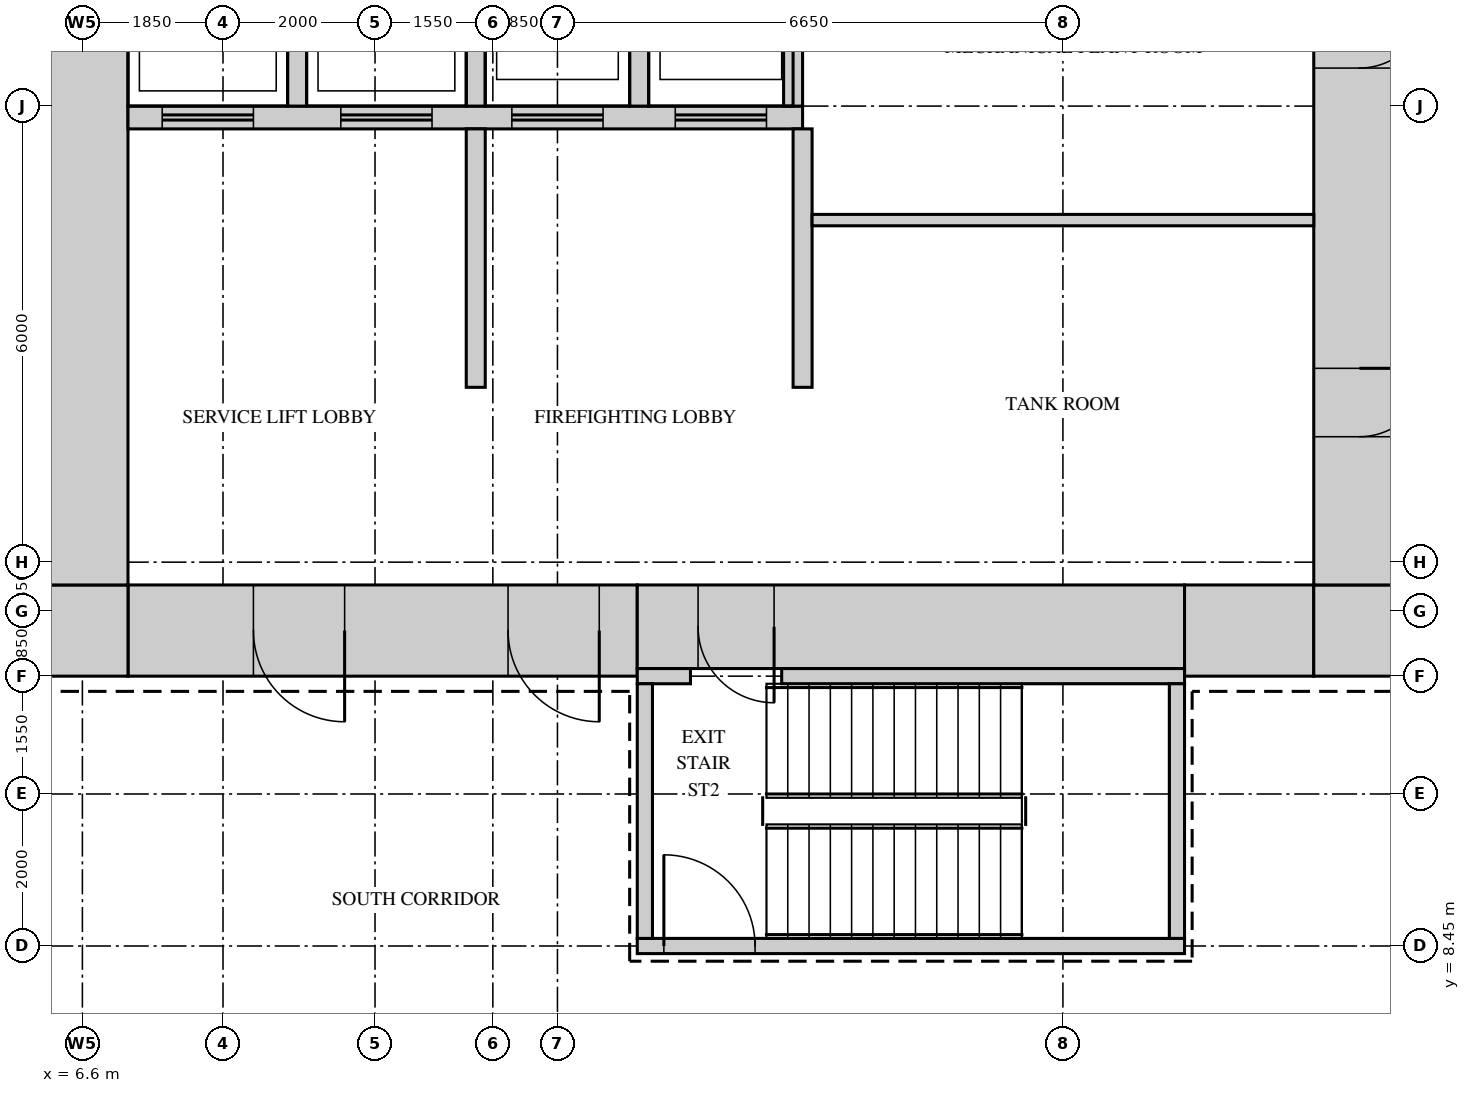
"""IFC4 building model, lengths in metres.
Left out: names, types, materials, properties, quantities, classifications, styles, units other than length and angle.
Written with IfcOpenShell. Run it as: python <this file> out.ifc"""

import sys

from ifc_helpers import new_model, si_unit, direction, frame, frame_2d, origin, place, context, subcontext, project, spatial, rectangle, extrude, source, transform, mapped, element, fill, save


model = new_model("IFC4")
c1 = context("Model", 3, precision=1e-05, world=origin(), true_north=direction((0.0, 1.0)))
c2 = subcontext(c1, "Body", "Model", "MODEL_VIEW")
j1 = project(units=[si_unit("LENGTHUNIT", "METRE"), si_unit("PLANEANGLEUNIT", "RADIAN")], contexts=[c1])
p1 = place(None, origin())
s1 = spatial("IfcSite", under=j1, at=p1, CompositionType="ELEMENT")
p2 = place(p1, origin())
s2 = spatial("IfcBuilding", under=s1, at=p2, CompositionType="ELEMENT")
p3 = place(p2, frame((0.0, 0.0, 42.0)))
s3 = spatial("IfcBuildingStorey", under=s2, at=p3, CompositionType="ELEMENT", Elevation=42.0)
m1 = source(origin(), c2, "Body", "SweptSolid", [
    extrude(rectangle(XDim=6.7, YDim=1.2, at=frame_2d((3.35, 0.0))), origin(), (0.0, 0.0, 1.0), 4.2),
])
p4 = place(p3, frame((7.2, 12.6, 0.0), z_axis=(0.0, 0.0, 1.0), x_axis=(1.0, 0.0, 0.0)))
e1 = element("IfcWall", 1, at=p4, inside=s3, PredefinedType="SHEAR", context=c2, shape_type="MappedRepresentation", body=[
    mapped(m1, transform((0.0, 0.0, 0.0))),
])
m2 = source(origin(), c2, "Body", "SweptSolid", [
    extrude(rectangle(XDim=1.2, YDim=2.1, at=frame_2d((0.6, 1.05))), frame((0.0, 0.61, 0.0), z_axis=(0.0, -1.0, 0.0), x_axis=(1.0, 0.0, 0.0)), (0.0, 0.0, 1.0), 1.22),
])
p5 = place(p4, frame((5.0, 0.0, 0.0)))
e2 = element("IfcOpeningElement", 2, at=p5, cuts=e1, PredefinedType="OPENING", context=c2, shape_type="MappedRepresentation", body=[
    mapped(m2, transform((0.0, 0.0, 0.0))),
])
p6 = place(p4, frame((1.65, 0.0, 0.0)))
e3 = element("IfcOpeningElement", 3, at=p6, cuts=e1, PredefinedType="OPENING", context=c2, shape_type="MappedRepresentation", body=[
    mapped(m2, transform((0.0, 0.0, 0.0))),
])
m3 = source(origin(), c2, "Body", "SweptSolid", [
    extrude(rectangle(XDim=7.2, YDim=1.1, at=frame_2d((3.6, 0.0))), origin(), (0.0, 0.0, 1.0), 4.2),
])
p7 = place(p3, frame((13.9, 12.65, 0.0), z_axis=(0.0, 0.0, 1.0), x_axis=(1.0, 0.0, 0.0)))
e4 = element("IfcWall", 4, at=p7, inside=s3, PredefinedType="SHEAR", context=c2, shape_type="MappedRepresentation", body=[
    mapped(m3, transform((0.0, 0.0, 0.0))),
])
m4 = source(origin(), c2, "Body", "SweptSolid", [
    extrude(rectangle(XDim=1.0, YDim=2.1, at=frame_2d((0.5, 1.05))), frame((0.0, 0.56, 0.0), z_axis=(0.0, -1.0, 0.0), x_axis=(1.0, 0.0, 0.0)), (0.0, 0.0, 1.0), 1.12),
])
p8 = place(p7, frame((0.8, 0.0, 0.0)))
e5 = element("IfcOpeningElement", 5, at=p8, cuts=e4, PredefinedType="OPENING", context=c2, shape_type="MappedRepresentation", body=[
    mapped(m4, transform((0.0, 0.0, 0.0))),
])
m5 = source(origin(), c2, "Body", "SweptSolid", [
    extrude(rectangle(XDim=1.7, YDim=1.2, at=frame_2d((0.85, 0.0))), origin(), (0.0, 0.0, 1.0), 4.2),
])
p9 = place(p3, frame((21.1, 12.6, 0.0), z_axis=(0.0, 0.0, 1.0), x_axis=(1.0, 0.0, 0.0)))
e6 = element("IfcWall", 6, at=p9, inside=s3, PredefinedType="SHEAR", context=c2, shape_type="MappedRepresentation", body=[
    mapped(m5, transform((0.0, 0.0, 0.0))),
])
m6 = source(origin(), c2, "Body", "SweptSolid", [
    extrude(rectangle(XDim=1.2, YDim=1.2, at=frame_2d((0.6, 0.0))), origin(), (0.0, 0.0, 1.0), 4.2),
])
for number, where, z_axis, x_axis in (
    (7, (22.8, 12.6, 0.0), (0.0, 0.0, 1.0), (1.0, 0.0, 0.0)),
    (8, (6.0, 12.6, 0.0), (0.0, 0.0, 1.0), (1.0, 0.0, 0.0)),
):
    element("IfcWall", number, at=place(p3, frame(where, z_axis=z_axis, x_axis=x_axis)), inside=s3, PredefinedType="SHEAR", context=c2, shape_type="MappedRepresentation", body=[
        mapped(m6, transform((0.0, 0.0, 0.0))),
    ])
m7 = source(origin(), c2, "Body", "SweptSolid", [
    extrude(rectangle(XDim=27.6, YDim=1.2, at=frame_2d((13.8, 0.0))), origin(), (0.0, 0.0, 1.0), 4.2),
])
p10 = place(p3, frame((23.4, 13.2, 0.0), z_axis=(0.0, 0.0, 1.0), x_axis=(0.0, 1.0, 0.0)))
e9 = element("IfcWall", 9, at=p10, inside=s3, PredefinedType="SHEAR", context=c2, shape_type="MappedRepresentation", body=[
    mapped(m7, transform((0.0, 0.0, 0.0))),
])
m8 = source(origin(), c2, "Body", "SweptSolid", [
    extrude(rectangle(XDim=1.8, YDim=2.1, at=frame_2d((0.9, 1.05))), frame((0.0, 0.61, 0.0), z_axis=(0.0, -1.0, 0.0), x_axis=(1.0, 0.0, 0.0)), (0.0, 0.0, 1.0), 1.22),
])
p11 = place(p10, frame((22.4, 0.0, 0.0)))
e10 = element("IfcOpeningElement", 10, at=p11, cuts=e9, PredefinedType="OPENING", context=c2, shape_type="MappedRepresentation", body=[
    mapped(m8, transform((0.0, 0.0, 0.0))),
])
p12 = place(p10, frame((13.65, 0.0, 0.0)))
e11 = element("IfcOpeningElement", 11, at=p12, cuts=e9, PredefinedType="OPENING", context=c2, shape_type="MappedRepresentation", body=[
    mapped(m2, transform((0.0, 0.0, 0.0))),
])
m9 = source(origin(), c2, "Body", "SweptSolid", [
    extrude(rectangle(XDim=0.9, YDim=2.1, at=frame_2d((0.45, 1.05))), frame((0.0, 0.61, 0.0), z_axis=(0.0, -1.0, 0.0), x_axis=(1.0, 0.0, 0.0)), (0.0, 0.0, 1.0), 1.22),
])
p13 = place(p10, frame((1.95, 0.0, 0.0)))
e12 = element("IfcOpeningElement", 12, at=p13, cuts=e9, PredefinedType="OPENING", context=c2, shape_type="MappedRepresentation", body=[
    mapped(m9, transform((0.0, 0.0, 0.0))),
])
p14 = place(p10, frame((6.8, 0.0, 0.0)))
e13 = element("IfcOpeningElement", 13, at=p14, cuts=e9, PredefinedType="OPENING", context=c2, shape_type="MappedRepresentation", body=[
    mapped(m9, transform((0.0, 0.0, 0.0))),
])
p15 = place(p3, frame((6.6, 13.2, 0.0), z_axis=(0.0, 0.0, 1.0), x_axis=(0.0, 1.0, 0.0)))
e14 = element("IfcWall", 14, at=p15, inside=s3, PredefinedType="SHEAR", context=c2, shape_type="MappedRepresentation", body=[
    mapped(m7, transform((0.0, 0.0, 0.0))),
])
m10 = source(origin(), c2, "Body", "SweptSolid", [
    extrude(rectangle(XDim=0.7, YDim=0.2, at=frame_2d((0.35, 0.0))), origin(), (0.0, 0.0, 1.0), 4.2),
])
p16 = place(p3, frame((13.9, 12.0, 0.0), z_axis=(0.0, 0.0, 1.0), x_axis=(1.0, 0.0, 0.0)))
e15 = element("IfcWall", 15, at=p16, inside=s3, PredefinedType="SHEAR", context=c2, shape_type="MappedRepresentation", body=[
    mapped(m10, transform((0.0, 0.0, 0.0))),
])
m11 = source(origin(), c2, "Body", "SweptSolid", [
    extrude(rectangle(XDim=5.3, YDim=0.2, at=frame_2d((2.65, 0.0))), origin(), (0.0, 0.0, 1.0), 4.2),
])
p17 = place(p3, frame((15.8, 12.0, 0.0), z_axis=(0.0, 0.0, 1.0), x_axis=(1.0, 0.0, 0.0)))
e16 = element("IfcWall", 16, at=p17, inside=s3, PredefinedType="SHEAR", context=c2, shape_type="MappedRepresentation", body=[
    mapped(m11, transform((0.0, 0.0, 0.0))),
])
m12 = source(origin(), c2, "Body", "SweptSolid", [
    extrude(rectangle(XDim=7.2, YDim=0.2, at=frame_2d((3.6, 0.0))), origin(), (0.0, 0.0, 1.0), 4.2),
])
p18 = place(p3, frame((13.9, 8.45, 0.0), z_axis=(0.0, 0.0, 1.0), x_axis=(1.0, 0.0, 0.0)))
e17 = element("IfcWall", 17, at=p18, inside=s3, PredefinedType="SHEAR", context=c2, shape_type="MappedRepresentation", body=[
    mapped(m12, transform((0.0, 0.0, 0.0))),
])
m13 = source(origin(), c2, "Body", "SweptSolid", [
    extrude(rectangle(XDim=1.2, YDim=2.1, at=frame_2d((0.6, 1.05))), frame((0.0, 0.11, 0.0), z_axis=(0.0, -1.0, 0.0), x_axis=(1.0, 0.0, 0.0)), (0.0, 0.0, 1.0), 0.22),
])
p19 = place(p18, frame((0.35, 0.0, 0.0)))
e18 = element("IfcOpeningElement", 18, at=p19, cuts=e17, PredefinedType="OPENING", context=c2, shape_type="MappedRepresentation", body=[
    mapped(m13, transform((0.0, 0.0, 0.0))),
])
m14 = source(origin(), c2, "Body", "SweptSolid", [
    extrude(rectangle(XDim=3.35, YDim=0.2, at=frame_2d((1.675, 0.0))), origin(), (0.0, 0.0, 1.0), 4.2),
])
for number, where, z_axis, x_axis in (
    (19, (21.0, 8.55, 0.0), (0.0, 0.0, 1.0), (0.0, 1.0, 0.0)),
    (20, (14.0, 8.55, 0.0), (0.0, 0.0, 1.0), (0.0, 1.0, 0.0)),
):
    element("IfcWall", number, at=place(p3, frame(where, z_axis=z_axis, x_axis=x_axis)), inside=s3, PredefinedType="SHEAR", context=c2, shape_type="MappedRepresentation", body=[
        mapped(m14, transform((0.0, 0.0, 0.0))),
    ])
m15 = source(origin(), c2, "Body", "SweptSolid", [
    extrude(rectangle(XDim=8.875, YDim=0.3, at=frame_2d((4.438, 0.0))), origin(), (0.0, 0.0, 1.0), 4.2),
])
p20 = place(p3, frame((7.2, 19.35, 0.0), z_axis=(0.0, 0.0, 1.0), x_axis=(1.0, 0.0, 0.0)))
e21 = element("IfcWall", 21, at=p20, inside=s3, PredefinedType="STANDARD", context=c2, shape_type="MappedRepresentation", body=[
    mapped(m15, transform((0.0, 0.0, 0.0))),
])
m16 = source(origin(), c2, "Body", "SweptSolid", [
    extrude(rectangle(XDim=1.2, YDim=2.1, at=frame_2d((0.6, 1.05))), frame((0.0, 0.16, 0.0), z_axis=(0.0, -1.0, 0.0), x_axis=(1.0, 0.0, 0.0)), (0.0, 0.0, 1.0), 0.32),
])
p21 = place(p20, frame((0.45, 0.0, 0.0)))
e22 = element("IfcOpeningElement", 22, at=p21, cuts=e21, PredefinedType="OPENING", context=c2, shape_type="MappedRepresentation", body=[
    mapped(m16, transform((0.0, 0.0, 0.0))),
])
p22 = place(p20, frame((2.8, 0.0, 0.0)))
e23 = element("IfcOpeningElement", 23, at=p22, cuts=e21, PredefinedType="OPENING", context=c2, shape_type="MappedRepresentation", body=[
    mapped(m16, transform((0.0, 0.0, 0.0))),
])
p23 = place(p20, frame((5.05, 0.0, 0.0)))
e24 = element("IfcOpeningElement", 24, at=p23, cuts=e21, PredefinedType="OPENING", context=c2, shape_type="MappedRepresentation", body=[
    mapped(m16, transform((0.0, 0.0, 0.0))),
])
p24 = place(p20, frame((7.2, 0.0, 0.0)))
e25 = element("IfcOpeningElement", 25, at=p24, cuts=e21, PredefinedType="OPENING", context=c2, shape_type="MappedRepresentation", body=[
    mapped(m16, transform((0.0, 0.0, 0.0))),
])
m17 = source(origin(), c2, "Body", "SweptSolid", [
    extrude(rectangle(XDim=3.1, YDim=0.25, at=frame_2d((1.55, 0.0))), origin(), (0.0, 0.0, 1.0), 4.2),
])
for number, where, z_axis, x_axis in (
    (26, (9.425, 19.5, 0.0), (0.0, 0.0, 1.0), (0.0, 1.0, 0.0)),
    (27, (11.775, 19.5, 0.0), (0.0, 0.0, 1.0), (0.0, 1.0, 0.0)),
    (28, (13.925, 19.5, 0.0), (0.0, 0.0, 1.0), (0.0, 1.0, 0.0)),
    (29, (15.95, 19.5, 0.0), (0.0, 0.0, 1.0), (0.0, 1.0, 0.0)),
):
    element("IfcWall", number, at=place(p3, frame(where, z_axis=z_axis, x_axis=x_axis)), inside=s3, PredefinedType="STANDARD", context=c2, shape_type="MappedRepresentation", body=[
        mapped(m17, transform((0.0, 0.0, 0.0))),
    ])
m18 = source(origin(), c2, "Body", "SweptSolid", [
    extrude(rectangle(XDim=3.4, YDim=0.25, at=frame_2d((1.7, 0.0))), origin(), (0.0, 0.0, 1.0), 4.2),
])
for number, where, z_axis, x_axis in (
    (30, (16.075, 15.8, 0.0), (0.0, 0.0, 1.0), (0.0, 1.0, 0.0)),
    (31, (11.775, 15.8, 0.0), (0.0, 0.0, 1.0), (0.0, 1.0, 0.0)),
):
    element("IfcWall", number, at=place(p3, frame(where, z_axis=z_axis, x_axis=x_axis)), inside=s3, PredefinedType="STANDARD", context=c2, shape_type="MappedRepresentation", body=[
        mapped(m18, transform((0.0, 0.0, 0.0))),
    ])
m19 = source(origin(), c2, "Body", "SweptSolid", [
    extrude(rectangle(XDim=6.6, YDim=0.15, at=frame_2d((3.3, 0.0))), origin(), (0.0, 0.0, 1.0), 4.3),
])
p25 = place(p3, frame((16.2, 18.0, 0.0), z_axis=(0.0, 0.0, 1.0), x_axis=(1.0, 0.0, 0.0)))
e32 = element("IfcWall", 32, at=p25, inside=s3, PredefinedType="PARTITIONING", context=c2, shape_type="MappedRepresentation", body=[
    mapped(m19, transform((0.0, 0.0, 0.0))),
])
m20 = source(origin(), c2, "Body", "SweptSolid", [
    extrude(rectangle(XDim=0.9, YDim=2.1, at=frame_2d((0.45, 1.05))), frame((0.0, 0.55, 0.0), z_axis=(0.0, -1.0, 0.0), x_axis=(1.0, 0.0, 0.0)), (0.0, 0.0, 1.0), 1.1),
])
p26 = place(p13, origin())
e33 = element("IfcDoor", 33, at=p26, inside=s3, OperationType="SINGLE_SWING_RIGHT", PredefinedType="DOOR", context=c2, shape_type="MappedRepresentation", body=[
    mapped(m20, transform((0.0, 0.0, 0.0))),
])
fill(e12, e33)
p27 = place(p14, origin())
e34 = element("IfcDoor", 34, at=p27, inside=s3, OperationType="SINGLE_SWING_RIGHT", PredefinedType="DOOR", context=c2, shape_type="MappedRepresentation", body=[
    mapped(m20, transform((0.0, 0.0, 0.0))),
])
fill(e13, e34)
m21 = source(origin(), c2, "Body", "SweptSolid", [
    extrude(rectangle(XDim=1.2, YDim=2.1, at=frame_2d((0.6, 1.05))), frame((0.0, 0.55, 0.0), z_axis=(0.0, -1.0, 0.0), x_axis=(1.0, 0.0, 0.0)), (0.0, 0.0, 1.0), 1.1),
])
p28 = place(p5, origin())
e35 = element("IfcDoor", 35, at=p28, inside=s3, OperationType="SINGLE_SWING_RIGHT", PredefinedType="DOOR", context=c2, shape_type="MappedRepresentation", body=[
    mapped(m21, transform((0.0, 0.0, 0.0))),
])
fill(e2, e35)
p29 = place(p6, origin())
e36 = element("IfcDoor", 36, at=p29, inside=s3, OperationType="SINGLE_SWING_RIGHT", PredefinedType="DOOR", context=c2, shape_type="MappedRepresentation", body=[
    mapped(m21, transform((0.0, 0.0, 0.0))),
])
fill(e3, e36)
m22 = source(origin(), c2, "Body", "SweptSolid", [
    extrude(rectangle(XDim=1.0, YDim=2.1, at=frame_2d((0.5, 1.05))), frame((0.0, 0.5, 0.0), z_axis=(0.0, -1.0, 0.0), x_axis=(1.0, 0.0, 0.0)), (0.0, 0.0, 1.0), 1.0),
])
p30 = place(p8, origin())
e37 = element("IfcDoor", 37, at=p30, inside=s3, OperationType="SINGLE_SWING_RIGHT", PredefinedType="DOOR", context=c2, shape_type="MappedRepresentation", body=[
    mapped(m22, transform((0.0, 0.0, 0.0))),
])
fill(e5, e37)
m23 = source(origin(), c2, "Body", "SweptSolid", [
    extrude(rectangle(XDim=1.2, YDim=2.1, at=frame_2d((0.6, 1.05))), frame((0.0, 0.025, 0.0), z_axis=(0.0, -1.0, 0.0), x_axis=(1.0, 0.0, 0.0)), (0.0, 0.0, 1.0), 0.05),
])
p31 = place(p19, origin())
e38 = element("IfcDoor", 38, at=p31, inside=s3, OperationType="SINGLE_SWING_RIGHT", PredefinedType="DOOR", context=c2, shape_type="MappedRepresentation", body=[
    mapped(m23, transform((0.0, 0.0, 0.0))),
])
fill(e18, e38)
p32 = place(p21, origin())
e39 = element("IfcDoor", 39, at=p32, inside=s3, OperationType="DOUBLE_DOOR_SLIDING", PredefinedType="DOOR", context=c2, shape_type="MappedRepresentation", body=[
    mapped(m23, transform((0.0, 0.0, 0.0))),
])
fill(e22, e39)
p33 = place(p22, origin())
e40 = element("IfcDoor", 40, at=p33, inside=s3, OperationType="DOUBLE_DOOR_SLIDING", PredefinedType="DOOR", context=c2, shape_type="MappedRepresentation", body=[
    mapped(m23, transform((0.0, 0.0, 0.0))),
])
fill(e23, e40)
p34 = place(p23, origin())
e41 = element("IfcDoor", 41, at=p34, inside=s3, OperationType="DOUBLE_DOOR_SLIDING", PredefinedType="DOOR", context=c2, shape_type="MappedRepresentation", body=[
    mapped(m23, transform((0.0, 0.0, 0.0))),
])
fill(e24, e41)
p35 = place(p24, origin())
e42 = element("IfcDoor", 42, at=p35, inside=s3, OperationType="DOUBLE_DOOR_SLIDING", PredefinedType="DOOR", context=c2, shape_type="MappedRepresentation", body=[
    mapped(m23, transform((0.0, 0.0, 0.0))),
])
fill(e25, e42)
save(model, sys.argv[1])
